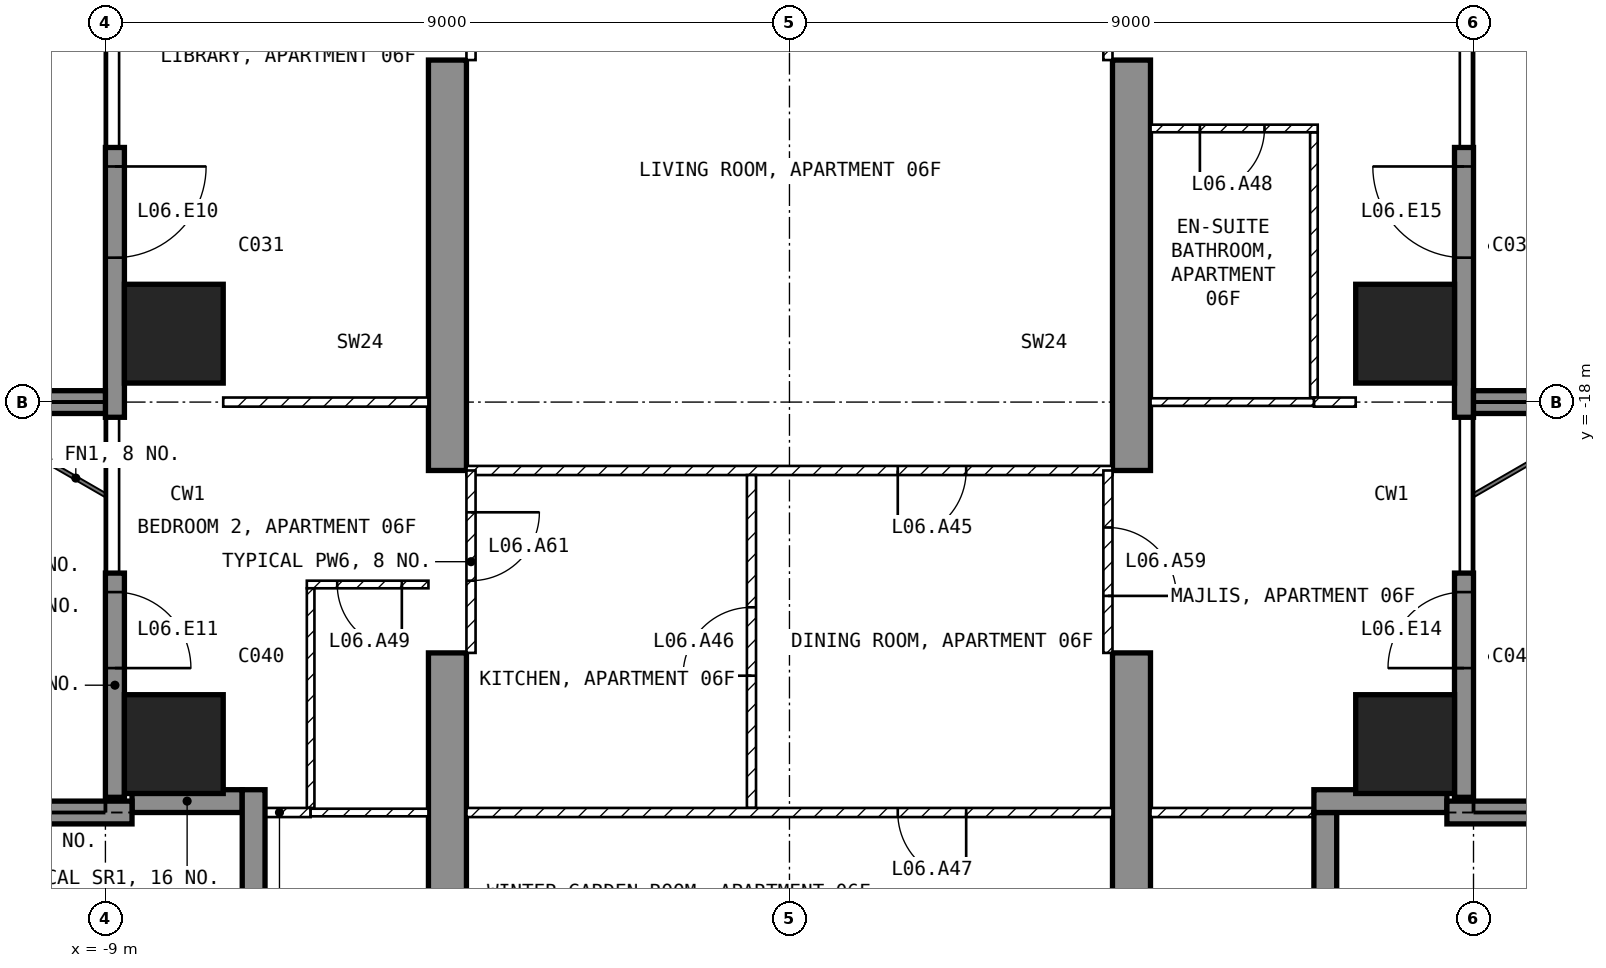
"""IFC4 building model, lengths in metres.
Left out: names, types, materials, properties, quantities, classifications, styles, units other than length and angle.
Written with IfcOpenShell. Run it as: python <this file> out.ifc"""

import sys

from ifc_helpers import new_model, si_unit, direction, frame, frame_2d, origin, origin_2d, place, context, subcontext, project, spatial, polyline, rectangle, outline, extrude, element, fill, save


model = new_model("IFC4")
c1 = context("Model", 3, precision=1e-05, world=origin(), true_north=direction((0.0, 1.0)))
c2 = subcontext(c1, "Body", "Model", "MODEL_VIEW")
j1 = project(units=[si_unit("LENGTHUNIT", "METRE"), si_unit("PLANEANGLEUNIT", "RADIAN")], contexts=[c1])
p1 = place(None, origin())
s1 = spatial("IfcSite", under=j1, at=p1, CompositionType="ELEMENT")
p2 = place(p1, origin())
s2 = spatial("IfcBuilding", under=s1, at=p2, CompositionType="ELEMENT")
p3 = place(p2, frame((0.0, 0.0, 40.0)))
s3 = spatial("IfcBuildingStorey", under=s2, at=p3, CompositionType="ELEMENT", Elevation=40.0)
for number, where, z_axis, x_axis in (
    (1, (-8.1, -22.5, -0.25), (0.0, 0.0, 1.0), (1.0, 0.0, 0.0)),
    (2, (-8.1, -17.1, -0.25), (0.0, 0.0, 1.0), (1.0, 0.0, 0.0)),
    (3, (8.1, -22.5, -0.25), (0.0, 0.0, 1.0), (1.0, 0.0, 0.0)),
    (4, (8.1, -17.1, -0.25), (0.0, 0.0, 1.0), (1.0, 0.0, 0.0)),
):
    element("IfcColumn", number, at=place(p3, frame(where, z_axis=z_axis, x_axis=x_axis)), inside=s3, PredefinedType="COLUMN", context=c2, shape_type="SweptSolid", body=[
        extrude(rectangle(XDim=1.3, YDim=1.3, at=origin_2d()), origin(), (0.0, 0.0, 1.0), 3.5),
    ])
for number, where, z_axis, x_axis in (
    (5, (-4.75, -25.45, -0.25), (1.0, 0.0, 0.0), (0.0, 1.0, 0.0)),
    (6, (4.25, -25.45, -0.25), (1.0, 0.0, 0.0), (0.0, 1.0, 0.0)),
):
    element("IfcWall", number, at=place(p3, frame(where, z_axis=z_axis, x_axis=x_axis)), inside=s3, PredefinedType="SHEAR", context=c2, shape_type="SweptSolid", body=[
        extrude(outline(polyline([(0.0, 0.0), (4.15, 0.0), (4.15, 2.65), (6.55, 2.65), (6.55, 0.0), (11.95, 0.0), (11.95, 2.65), (14.35, 2.65), (14.35, 0.0), (16.45, 0.0), (16.45, 3.5), (0.0, 3.5), (0.0, 0.0)])), origin(), (0.0, 0.0, 1.0), 0.5),
    ])
p4 = place(p3, frame((-8.875, -14.65, 0.0), z_axis=(0.0, 0.0, 1.0), x_axis=(0.0, -1.0, 0.0)))
e7 = element("IfcWall", 7, at=p4, inside=s3, PredefinedType="SOLIDWALL", context=c2, shape_type="SweptSolid", body=[
    extrude(rectangle(XDim=3.55, YDim=0.25, at=frame_2d((1.775, 0.0))), origin(), (0.0, 0.0, 1.0), 3.25),
])
p5 = place(p4, frame((0.25, 0.0, 0.0)))
e8 = element("IfcOpeningElement", 8, at=p5, cuts=e7, PredefinedType="OPENING", context=c2, shape_type="SweptSolid", body=[
    extrude(rectangle(XDim=1.2, YDim=2.4, at=frame_2d((0.6, 1.2))), frame((0.0, 0.135, 0.0), z_axis=(0.0, -1.0, 0.0), x_axis=(1.0, 0.0, 0.0)), (0.0, 0.0, 1.0), 0.27),
])
p6 = place(p3, frame((-8.875, -20.25, 0.0), z_axis=(0.0, 0.0, 1.0), x_axis=(0.0, -1.0, 0.0)))
e9 = element("IfcWall", 9, at=p6, inside=s3, PredefinedType="SOLIDWALL", context=c2, shape_type="SweptSolid", body=[
    extrude(rectangle(XDim=2.95, YDim=0.25, at=frame_2d((1.475, 0.0))), origin(), (0.0, 0.0, 1.0), 3.25),
])
p7 = place(p6, frame((0.25, 0.0, 0.0)))
e10 = element("IfcOpeningElement", 10, at=p7, cuts=e9, PredefinedType="OPENING", context=c2, shape_type="SweptSolid", body=[
    extrude(rectangle(XDim=1.0, YDim=2.4, at=frame_2d((0.5, 1.2))), frame((0.0, 0.135, 0.0), z_axis=(0.0, -1.0, 0.0), x_axis=(1.0, 0.0, 0.0)), (0.0, 0.0, 1.0), 0.27),
])
p8 = place(p3, frame((8.875, -23.2, 0.0), z_axis=(0.0, 0.0, 1.0), x_axis=(0.0, 1.0, 0.0)))
e11 = element("IfcWall", 11, at=p8, inside=s3, PredefinedType="SOLIDWALL", context=c2, shape_type="SweptSolid", body=[
    extrude(rectangle(XDim=2.95, YDim=0.25, at=frame_2d((1.475, 0.0))), origin(), (0.0, 0.0, 1.0), 3.25),
])
p9 = place(p8, frame((1.7, 0.0, 0.0)))
e12 = element("IfcOpeningElement", 12, at=p9, cuts=e11, PredefinedType="OPENING", context=c2, shape_type="SweptSolid", body=[
    extrude(rectangle(XDim=1.0, YDim=2.4, at=frame_2d((0.5, 1.2))), frame((0.0, 0.135, 0.0), z_axis=(0.0, -1.0, 0.0), x_axis=(1.0, 0.0, 0.0)), (0.0, 0.0, 1.0), 0.27),
])
p10 = place(p3, frame((8.875, -18.2, 0.0), z_axis=(0.0, 0.0, 1.0), x_axis=(0.0, 1.0, 0.0)))
e13 = element("IfcWall", 13, at=p10, inside=s3, PredefinedType="SOLIDWALL", context=c2, shape_type="SweptSolid", body=[
    extrude(rectangle(XDim=3.55, YDim=0.25, at=frame_2d((1.775, 0.0))), origin(), (0.0, 0.0, 1.0), 3.25),
])
p11 = place(p10, frame((2.1, 0.0, 0.0)))
e14 = element("IfcOpeningElement", 14, at=p11, cuts=e13, PredefinedType="OPENING", context=c2, shape_type="SweptSolid", body=[
    extrude(rectangle(XDim=1.2, YDim=2.4, at=frame_2d((0.6, 1.2))), frame((0.0, 0.135, 0.0), z_axis=(0.0, -1.0, 0.0), x_axis=(1.0, 0.0, 0.0)), (0.0, 0.0, 1.0), 0.27),
])
p12 = place(p3, frame((7.05, -25.2, 0.0), z_axis=(0.0, 0.0, 1.0), x_axis=(0.0, 1.0, 0.0)))
e15 = element("IfcWall", 15, at=p12, inside=s3, PredefinedType="SOLIDWALL", context=c2, shape_type="SweptSolid", body=[
    extrude(rectangle(XDim=1.8, YDim=0.3, at=frame_2d((0.9, 0.0))), origin(), (0.0, 0.0, 1.0), 3.25),
])
p13 = place(p3, frame((6.9, -23.25, 0.0), z_axis=(0.0, 0.0, 1.0), x_axis=(1.0, 0.0, 0.0)))
e16 = element("IfcWall", 16, at=p13, inside=s3, PredefinedType="SOLIDWALL", context=c2, shape_type="SweptSolid", body=[
    extrude(rectangle(XDim=1.75, YDim=0.3, at=frame_2d((0.875, 0.0))), origin(), (0.0, 0.0, 1.0), 3.25),
])
p14 = place(p3, frame((-8.65, -23.25, 0.0), z_axis=(0.0, 0.0, 1.0), x_axis=(1.0, 0.0, 0.0)))
e17 = element("IfcWall", 17, at=p14, inside=s3, PredefinedType="SOLIDWALL", context=c2, shape_type="SweptSolid", body=[
    extrude(rectangle(XDim=1.45, YDim=0.3, at=frame_2d((0.725, 0.0))), origin(), (0.0, 0.0, 1.0), 3.25),
])
p15 = place(p3, frame((-7.05, -23.1, 0.0), z_axis=(0.0, 0.0, 1.0), x_axis=(0.0, -1.0, 0.0)))
e18 = element("IfcWall", 18, at=p15, inside=s3, PredefinedType="SOLIDWALL", context=c2, shape_type="SweptSolid", body=[
    extrude(rectangle(XDim=1.8, YDim=0.3, at=frame_2d((0.9, 0.0))), origin(), (0.0, 0.0, 1.0), 3.25),
])
p16 = place(p3, frame((-8.65, -23.4, 0.0), z_axis=(0.0, 0.0, 1.0), x_axis=(-1.0, 0.0, 0.0)))
e19 = element("IfcWall", 19, at=p16, inside=s3, PredefinedType="SOLIDWALL", context=c2, shape_type="SweptSolid", body=[
    extrude(rectangle(XDim=3.05, YDim=0.3, at=frame_2d((1.525, 0.0))), origin(), (0.0, 0.0, 1.0), 3.25),
])
p17 = place(p3, frame((-9.0, -18.0, 0.0), z_axis=(0.0, 0.0, 1.0), x_axis=(-1.0, 0.0, 0.0)))
e20 = element("IfcWall", 20, at=p17, inside=s3, PredefinedType="SOLIDWALL", context=c2, shape_type="SweptSolid", body=[
    extrude(rectangle(XDim=2.7, YDim=0.3, at=frame_2d((1.35, 0.0))), origin(), (0.0, 0.0, 1.0), 3.25),
])
p18 = place(p3, frame((8.65, -23.4, 0.0), z_axis=(0.0, 0.0, 1.0), x_axis=(1.0, 0.0, 0.0)))
e21 = element("IfcWall", 21, at=p18, inside=s3, PredefinedType="SOLIDWALL", context=c2, shape_type="SweptSolid", body=[
    extrude(rectangle(XDim=3.05, YDim=0.3, at=frame_2d((1.525, 0.0))), origin(), (0.0, 0.0, 1.0), 3.25),
])
p19 = place(p3, frame((9.0, -18.0, 0.0), z_axis=(0.0, 0.0, 1.0), x_axis=(1.0, 0.0, 0.0)))
e22 = element("IfcWall", 22, at=p19, inside=s3, PredefinedType="SOLIDWALL", context=c2, shape_type="SweptSolid", body=[
    extrude(rectangle(XDim=2.7, YDim=0.3, at=frame_2d((1.35, 0.0))), origin(), (0.0, 0.0, 1.0), 3.25),
])
p20 = place(p3, frame((4.25, -18.9, 0.0), z_axis=(0.0, 0.0, 1.0), x_axis=(-1.0, 0.0, 0.0)))
e23 = element("IfcWall", 23, at=p20, inside=s3, PredefinedType="PARTITIONING", context=c2, shape_type="SweptSolid", body=[
    extrude(rectangle(XDim=8.5, YDim=0.12, at=frame_2d((4.25, 0.0))), origin(), (0.0, 0.0, 1.0), 3.25),
])
p21 = place(p20, frame((1.925, 0.0, 0.0)))
e24 = element("IfcOpeningElement", 24, at=p21, cuts=e23, PredefinedType="OPENING", context=c2, shape_type="SweptSolid", body=[
    extrude(rectangle(XDim=0.9, YDim=2.1, at=frame_2d((0.45, 1.05))), frame((0.0, 0.07, 0.0), z_axis=(0.0, -1.0, 0.0), x_axis=(1.0, 0.0, 0.0)), (0.0, 0.0, 1.0), 0.14),
])
p22 = place(p3, frame((-0.5, -23.34, 0.0), z_axis=(0.0, 0.0, 1.0), x_axis=(0.0, 1.0, 0.0)))
e25 = element("IfcWall", 25, at=p22, inside=s3, PredefinedType="PARTITIONING", context=c2, shape_type="SweptSolid", body=[
    extrude(rectangle(XDim=4.38, YDim=0.12, at=frame_2d((2.19, 0.0))), origin(), (0.0, 0.0, 1.0), 3.25),
])
p23 = place(p22, frame((1.74, 0.0, 0.0)))
e26 = element("IfcOpeningElement", 26, at=p23, cuts=e25, PredefinedType="OPENING", context=c2, shape_type="SweptSolid", body=[
    extrude(rectangle(XDim=0.9, YDim=2.1, at=frame_2d((0.45, 1.05))), frame((0.0, 0.07, 0.0), z_axis=(0.0, -1.0, 0.0), x_axis=(1.0, 0.0, 0.0)), (0.0, 0.0, 1.0), 0.14),
])
p24 = place(p3, frame((4.25, -23.4, 0.0), z_axis=(0.0, 0.0, 1.0), x_axis=(-1.0, 0.0, 0.0)))
e27 = element("IfcWall", 27, at=p24, inside=s3, PredefinedType="PARTITIONING", context=c2, shape_type="SweptSolid", body=[
    extrude(rectangle(XDim=8.5, YDim=0.12, at=frame_2d((4.25, 0.0))), origin(), (0.0, 0.0, 1.0), 3.25),
])
p25 = place(p24, frame((1.925, 0.0, 0.0)))
e28 = element("IfcOpeningElement", 28, at=p25, cuts=e27, PredefinedType="OPENING", context=c2, shape_type="SweptSolid", body=[
    extrude(rectangle(XDim=0.9, YDim=2.1, at=frame_2d((0.45, 1.05))), frame((0.0, 0.07, 0.0), z_axis=(0.0, -1.0, 0.0), x_axis=(1.0, 0.0, 0.0)), (0.0, 0.0, 1.0), 0.14),
])
p26 = place(p3, frame((6.9, -17.94, 0.0), z_axis=(0.0, 0.0, 1.0), x_axis=(0.0, 1.0, 0.0)))
e29 = element("IfcWall", 29, at=p26, inside=s3, PredefinedType="PARTITIONING", context=c2, shape_type="SweptSolid", body=[
    extrude(rectangle(XDim=3.49, YDim=0.1, at=frame_2d((1.745, 0.0))), origin(), (0.0, 0.0, 1.0), 3.25),
])
p27 = place(p3, frame((6.95, -14.4, 0.0), z_axis=(0.0, 0.0, 1.0), x_axis=(-1.0, 0.0, 0.0)))
e30 = element("IfcWall", 30, at=p27, inside=s3, PredefinedType="PARTITIONING", context=c2, shape_type="SweptSolid", body=[
    extrude(rectangle(XDim=2.2, YDim=0.1, at=frame_2d((1.1, 0.0))), origin(), (0.0, 0.0, 1.0), 3.25),
])
p28 = place(p27, frame((0.7, 0.0, 0.0)))
e31 = element("IfcOpeningElement", 31, at=p28, cuts=e30, PredefinedType="OPENING", context=c2, shape_type="SweptSolid", body=[
    extrude(rectangle(XDim=0.85, YDim=2.1, at=frame_2d((0.425, 1.05))), frame((0.0, 0.06, 0.0), z_axis=(0.0, -1.0, 0.0), x_axis=(1.0, 0.0, 0.0)), (0.0, 0.0, 1.0), 0.12),
])
p29 = place(p3, frame((7.45, -18.0, 0.0), z_axis=(0.0, 0.0, 1.0), x_axis=(-1.0, 0.0, 0.0)))
e32 = element("IfcWall", 32, at=p29, inside=s3, PredefinedType="PARTITIONING", context=c2, shape_type="SweptSolid", body=[
    extrude(rectangle(XDim=0.55, YDim=0.12, at=frame_2d((0.275, 0.0))), origin(), (0.0, 0.0, 1.0), 3.25),
])
p30 = place(p3, frame((6.9, -18.0, 0.0), z_axis=(0.0, 0.0, 1.0), x_axis=(-1.0, 0.0, 0.0)))
e33 = element("IfcWall", 33, at=p30, inside=s3, PredefinedType="PARTITIONING", context=c2, shape_type="SweptSolid", body=[
    extrude(rectangle(XDim=2.15, YDim=0.1, at=frame_2d((1.075, 0.0))), origin(), (0.0, 0.0, 1.0), 3.25),
])
p31 = place(p3, frame((7.12, -23.4, 0.0), z_axis=(0.0, 0.0, 1.0), x_axis=(-1.0, 0.0, 0.0)))
e34 = element("IfcWall", 34, at=p31, inside=s3, PredefinedType="PARTITIONING", context=c2, shape_type="SweptSolid", body=[
    extrude(rectangle(XDim=2.37, YDim=0.12, at=frame_2d((1.185, 0.0))), origin(), (0.0, 0.0, 1.0), 3.25),
])
p32 = place(p3, frame((-4.75, -18.0, 0.0), z_axis=(0.0, 0.0, 1.0), x_axis=(-1.0, 0.0, 0.0)))
e35 = element("IfcWall", 35, at=p32, inside=s3, PredefinedType="PARTITIONING", context=c2, shape_type="SweptSolid", body=[
    extrude(rectangle(XDim=2.7, YDim=0.12, at=frame_2d((1.35, 0.0))), origin(), (0.0, 0.0, 1.0), 3.25),
])
p33 = place(p3, frame((-4.75, -20.4, 0.0), z_axis=(0.0, 0.0, 1.0), x_axis=(-1.0, 0.0, 0.0)))
e36 = element("IfcWall", 36, at=p33, inside=s3, PredefinedType="PARTITIONING", context=c2, shape_type="SweptSolid", body=[
    extrude(rectangle(XDim=1.6, YDim=0.1, at=frame_2d((0.8, 0.0))), origin(), (0.0, 0.0, 1.0), 3.25),
])
p34 = place(p33, frame((0.35, 0.0, 0.0)))
e37 = element("IfcOpeningElement", 37, at=p34, cuts=e36, PredefinedType="OPENING", context=c2, shape_type="SweptSolid", body=[
    extrude(rectangle(XDim=0.85, YDim=2.1, at=frame_2d((0.425, 1.05))), frame((0.0, 0.06, 0.0), z_axis=(0.0, -1.0, 0.0), x_axis=(1.0, 0.0, 0.0)), (0.0, 0.0, 1.0), 0.12),
])
p35 = place(p3, frame((-6.3, -20.45, 0.0), z_axis=(0.0, 0.0, 1.0), x_axis=(0.0, -1.0, 0.0)))
e38 = element("IfcWall", 38, at=p35, inside=s3, PredefinedType="PARTITIONING", context=c2, shape_type="SweptSolid", body=[
    extrude(rectangle(XDim=2.89, YDim=0.1, at=frame_2d((1.445, 0.0))), origin(), (0.0, 0.0, 1.0), 3.25),
])
p36 = place(p3, frame((-6.3, -23.4, 0.0), z_axis=(0.0, 0.0, 1.0), x_axis=(-1.0, 0.0, 0.0)))
e39 = element("IfcWall", 39, at=p36, inside=s3, PredefinedType="PARTITIONING", context=c2, shape_type="SweptSolid", body=[
    extrude(rectangle(XDim=0.82, YDim=0.12, at=frame_2d((0.41, 0.0))), origin(), (0.0, 0.0, 1.0), 3.25),
])
p37 = place(p3, frame((-4.75, -23.4, 0.0), z_axis=(0.0, 0.0, 1.0), x_axis=(-1.0, 0.0, 0.0)))
e40 = element("IfcWall", 40, at=p37, inside=s3, PredefinedType="PARTITIONING", context=c2, shape_type="SweptSolid", body=[
    extrude(rectangle(XDim=1.55, YDim=0.1, at=frame_2d((0.775, 0.0))), origin(), (0.0, 0.0, 1.0), 3.25),
])
p38 = place(p3, frame((4.19, -11.1, 0.0), z_axis=(0.0, 0.0, 1.0), x_axis=(0.0, -1.0, 0.0)))
e41 = element("IfcWall", 41, at=p38, inside=s3, PredefinedType="PARTITIONING", context=c2, shape_type="SweptSolid", body=[
    extrude(rectangle(XDim=2.4, YDim=0.12, at=frame_2d((1.2, 0.0))), origin(), (0.0, 0.0, 1.0), 2.4),
])
p39 = place(p38, frame((0.75, 0.0, 0.0)))
e42 = element("IfcOpeningElement", 42, at=p39, cuts=e41, PredefinedType="OPENING", context=c2, shape_type="SweptSolid", body=[
    extrude(rectangle(XDim=0.9, YDim=2.1, at=frame_2d((0.45, 1.05))), frame((0.0, 0.07, 0.0), z_axis=(0.0, -1.0, 0.0), x_axis=(1.0, 0.0, 0.0)), (0.0, 0.0, 1.0), 0.14),
])
p40 = place(p3, frame((4.19, -18.9, 0.0), z_axis=(0.0, 0.0, 1.0), x_axis=(0.0, -1.0, 0.0)))
e43 = element("IfcWall", 43, at=p40, inside=s3, PredefinedType="PARTITIONING", context=c2, shape_type="SweptSolid", body=[
    extrude(rectangle(XDim=2.4, YDim=0.12, at=frame_2d((1.2, 0.0))), origin(), (0.0, 0.0, 1.0), 2.4),
])
p41 = place(p40, frame((0.75, 0.0, 0.0)))
e44 = element("IfcOpeningElement", 44, at=p41, cuts=e43, PredefinedType="OPENING", context=c2, shape_type="SweptSolid", body=[
    extrude(rectangle(XDim=0.9, YDim=2.1, at=frame_2d((0.45, 1.05))), frame((0.0, 0.07, 0.0), z_axis=(0.0, -1.0, 0.0), x_axis=(1.0, 0.0, 0.0)), (0.0, 0.0, 1.0), 0.14),
])
p42 = place(p3, frame((-4.19, -11.1, 0.0), z_axis=(0.0, 0.0, 1.0), x_axis=(0.0, -1.0, 0.0)))
e45 = element("IfcWall", 45, at=p42, inside=s3, PredefinedType="PARTITIONING", context=c2, shape_type="SweptSolid", body=[
    extrude(rectangle(XDim=2.4, YDim=0.12, at=frame_2d((1.2, 0.0))), origin(), (0.0, 0.0, 1.0), 2.4),
])
p43 = place(p42, frame((0.75, 0.0, 0.0)))
e46 = element("IfcOpeningElement", 46, at=p43, cuts=e45, PredefinedType="OPENING", context=c2, shape_type="SweptSolid", body=[
    extrude(rectangle(XDim=0.9, YDim=2.1, at=frame_2d((0.45, 1.05))), frame((0.0, 0.07, 0.0), z_axis=(0.0, -1.0, 0.0), x_axis=(1.0, 0.0, 0.0)), (0.0, 0.0, 1.0), 0.14),
])
p44 = place(p3, frame((-4.19, -18.9, 0.0), z_axis=(0.0, 0.0, 1.0), x_axis=(0.0, -1.0, 0.0)))
e47 = element("IfcWall", 47, at=p44, inside=s3, PredefinedType="PARTITIONING", context=c2, shape_type="SweptSolid", body=[
    extrude(rectangle(XDim=2.4, YDim=0.12, at=frame_2d((1.2, 0.0))), origin(), (0.0, 0.0, 1.0), 2.4),
])
p45 = place(p44, frame((0.55, 0.0, 0.0)))
e48 = element("IfcOpeningElement", 48, at=p45, cuts=e47, PredefinedType="OPENING", context=c2, shape_type="SweptSolid", body=[
    extrude(rectangle(XDim=0.9, YDim=2.1, at=frame_2d((0.45, 1.05))), frame((0.0, 0.07, 0.0), z_axis=(0.0, -1.0, 0.0), x_axis=(1.0, 0.0, 0.0)), (0.0, 0.0, 1.0), 0.14),
])
p46 = place(p5, origin())
e49 = element("IfcDoor", 49, at=p46, inside=s3, OperationType="SINGLE_SWING_LEFT", PredefinedType="DOOR", context=c2, shape_type="SweptSolid", body=[
    extrude(rectangle(XDim=1.2, YDim=2.4, at=frame_2d((0.6, 1.2))), frame((0.0, 0.025, 0.0), z_axis=(0.0, -1.0, 0.0), x_axis=(1.0, 0.0, 0.0)), (0.0, 0.0, 1.0), 0.05),
])
fill(e8, e49)
p47 = place(p7, origin())
e50 = element("IfcDoor", 50, at=p47, inside=s3, OperationType="SINGLE_SWING_RIGHT", PredefinedType="DOOR", context=c2, shape_type="SweptSolid", body=[
    extrude(rectangle(XDim=1.0, YDim=2.4, at=frame_2d((0.5, 1.2))), frame((0.0, 0.025, 0.0), z_axis=(0.0, -1.0, 0.0), x_axis=(1.0, 0.0, 0.0)), (0.0, 0.0, 1.0), 0.05),
])
fill(e10, e50)
p48 = place(p9, origin())
e51 = element("IfcDoor", 51, at=p48, inside=s3, OperationType="SINGLE_SWING_LEFT", PredefinedType="DOOR", context=c2, shape_type="SweptSolid", body=[
    extrude(rectangle(XDim=1.0, YDim=2.4, at=frame_2d((0.5, 1.2))), frame((0.0, 0.025, 0.0), z_axis=(0.0, -1.0, 0.0), x_axis=(1.0, 0.0, 0.0)), (0.0, 0.0, 1.0), 0.05),
])
fill(e12, e51)
p49 = place(p11, origin())
e52 = element("IfcDoor", 52, at=p49, inside=s3, OperationType="SINGLE_SWING_RIGHT", PredefinedType="DOOR", context=c2, shape_type="SweptSolid", body=[
    extrude(rectangle(XDim=1.2, YDim=2.4, at=frame_2d((0.6, 1.2))), frame((0.0, 0.025, 0.0), z_axis=(0.0, -1.0, 0.0), x_axis=(1.0, 0.0, 0.0)), (0.0, 0.0, 1.0), 0.05),
])
fill(e14, e52)
p50 = place(p21, origin())
e53 = element("IfcDoor", 53, at=p50, inside=s3, OperationType="SINGLE_SWING_RIGHT", PredefinedType="DOOR", context=c2, shape_type="SweptSolid", body=[
    extrude(rectangle(XDim=0.9, YDim=2.1, at=frame_2d((0.45, 1.05))), frame((0.0, 0.025, 0.0), z_axis=(0.0, -1.0, 0.0), x_axis=(1.0, 0.0, 0.0)), (0.0, 0.0, 1.0), 0.05),
])
fill(e24, e53)
p51 = place(p23, origin())
e54 = element("IfcDoor", 54, at=p51, inside=s3, OperationType="SINGLE_SWING_LEFT", PredefinedType="DOOR", context=c2, shape_type="SweptSolid", body=[
    extrude(rectangle(XDim=0.9, YDim=2.1, at=frame_2d((0.45, 1.05))), frame((0.0, 0.025, 0.0), z_axis=(0.0, -1.0, 0.0), x_axis=(1.0, 0.0, 0.0)), (0.0, 0.0, 1.0), 0.05),
])
fill(e26, e54)
p52 = place(p25, origin())
e55 = element("IfcDoor", 55, at=p52, inside=s3, OperationType="SINGLE_SWING_LEFT", PredefinedType="DOOR", context=c2, shape_type="SweptSolid", body=[
    extrude(rectangle(XDim=0.9, YDim=2.1, at=frame_2d((0.45, 1.05))), frame((0.0, 0.025, 0.0), z_axis=(0.0, -1.0, 0.0), x_axis=(1.0, 0.0, 0.0)), (0.0, 0.0, 1.0), 0.05),
])
fill(e28, e55)
p53 = place(p28, origin())
e56 = element("IfcDoor", 56, at=p53, inside=s3, OperationType="SINGLE_SWING_RIGHT", PredefinedType="DOOR", context=c2, shape_type="SweptSolid", body=[
    extrude(rectangle(XDim=0.85, YDim=2.1, at=frame_2d((0.425, 1.05))), frame((0.0, 0.025, 0.0), z_axis=(0.0, -1.0, 0.0), x_axis=(1.0, 0.0, 0.0)), (0.0, 0.0, 1.0), 0.05),
])
fill(e31, e56)
p54 = place(p34, origin())
e57 = element("IfcDoor", 57, at=p54, inside=s3, OperationType="SINGLE_SWING_LEFT", PredefinedType="DOOR", context=c2, shape_type="SweptSolid", body=[
    extrude(rectangle(XDim=0.85, YDim=2.1, at=frame_2d((0.425, 1.05))), frame((0.0, 0.025, 0.0), z_axis=(0.0, -1.0, 0.0), x_axis=(1.0, 0.0, 0.0)), (0.0, 0.0, 1.0), 0.05),
])
fill(e37, e57)
p55 = place(p41, origin())
e58 = element("IfcDoor", 58, at=p55, inside=s3, OperationType="SINGLE_SWING_RIGHT", PredefinedType="DOOR", context=c2, shape_type="SweptSolid", body=[
    extrude(rectangle(XDim=0.9, YDim=2.1, at=frame_2d((0.45, 1.05))), frame((0.0, 0.025, 0.0), z_axis=(0.0, -1.0, 0.0), x_axis=(1.0, 0.0, 0.0)), (0.0, 0.0, 1.0), 0.05),
])
fill(e44, e58)
p56 = place(p45, origin())
e59 = element("IfcDoor", 59, at=p56, inside=s3, OperationType="SINGLE_SWING_LEFT", PredefinedType="DOOR", context=c2, shape_type="SweptSolid", body=[
    extrude(rectangle(XDim=0.9, YDim=2.1, at=frame_2d((0.45, 1.05))), frame((0.0, 0.025, 0.0), z_axis=(0.0, -1.0, 0.0), x_axis=(1.0, 0.0, 0.0)), (0.0, 0.0, 1.0), 0.05),
])
fill(e48, e59)
save(model, sys.argv[1])
